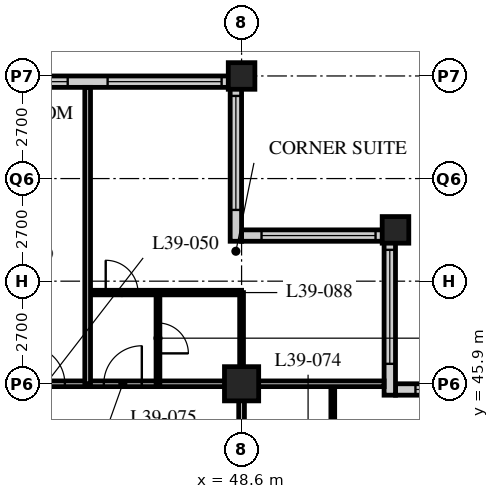
"""IFC4 building model, lengths in metres.
Left out: names, types, materials, properties, quantities, classifications, styles, units other than length and angle.
Written with IfcOpenShell. Run it as: python <this file> out.ifc"""

import sys

from ifc_helpers import new_model, si_unit, direction, frame, frame_2d, origin, origin_2d, place, context, subcontext, project, spatial, rectangle, hollow_rectangle, extrude, element, fill, save


model = new_model("IFC4")
c1 = context("Model", 3, precision=1e-05, world=origin(), true_north=direction((0.0, 1.0)))
c2 = subcontext(c1, "Body", "Model", "MODEL_VIEW")
j1 = project(units=[si_unit("LENGTHUNIT", "METRE"), si_unit("PLANEANGLEUNIT", "RADIAN")], contexts=[c1])
p1 = place(None, origin())
s1 = spatial("IfcSite", under=j1, at=p1, CompositionType="ELEMENT")
p2 = place(p1, origin())
s2 = spatial("IfcBuilding", under=s1, at=p2, CompositionType="ELEMENT")
p3 = place(p2, frame((0.0, 0.0, 151.0)))
s3 = spatial("IfcBuildingStorey", under=s2, at=p3, CompositionType="ELEMENT", Elevation=151.0)
p4 = place(p3, frame((48.6, 45.9, 0.0), z_axis=(0.0, 0.0, 1.0), x_axis=(1.0, 0.0, 0.0)))
e1 = element("IfcColumn", 1, at=p4, inside=s3, PredefinedType="COLUMN", context=c2, shape_type="SweptSolid", body=[
    extrude(hollow_rectangle(XDim=0.9, YDim=0.9, WallThickness=0.1, at=origin_2d()), origin(), (0.0, 0.0, 1.0), 3.4),
])
for number, where, z_axis, x_axis in (
    (2, (48.6, 54.0, 0.0), (0.0, 0.0, 1.0), (1.0, 0.0, 0.0)),
    (3, (52.65, 49.95, 0.0), (0.0, 0.0, 1.0), (1.0, 0.0, 0.0)),
):
    element("IfcColumn", number, at=place(p3, frame(where, z_axis=z_axis, x_axis=x_axis)), inside=s3, PredefinedType="COLUMN", context=c2, shape_type="SweptSolid", body=[
        extrude(hollow_rectangle(XDim=0.7, YDim=0.7, WallThickness=0.07, at=origin_2d()), origin(), (0.0, 0.0, 1.0), 3.4),
    ])
p5 = place(p3, frame((56.4, 45.75, 0.0), z_axis=(0.0, 0.0, 1.0), x_axis=(-1.0, 0.0, 0.0)))
e4 = element("IfcWall", 4, at=p5, inside=s3, PredefinedType="SOLIDWALL", context=c2, shape_type="SweptSolid", body=[
    extrude(rectangle(XDim=3.75, YDim=0.3, at=frame_2d((1.875, 0.0))), origin(), (0.0, 0.0, 1.0), 3.19),
])
p6 = place(p5, frame((0.225, 0.0, 0.9)))
e5 = element("IfcOpeningElement", 5, at=p6, cuts=e4, PredefinedType="OPENING", context=c2, shape_type="SweptSolid", body=[
    extrude(rectangle(XDim=3.0, YDim=1.4, at=frame_2d((1.5, 0.7))), frame((0.0, 0.16, 0.0), z_axis=(0.0, -1.0, 0.0), x_axis=(1.0, 0.0, 0.0)), (0.0, 0.0, 1.0), 0.32),
])
p7 = place(p3, frame((52.5, 45.6, 0.0), z_axis=(0.0, 0.0, 1.0), x_axis=(0.0, 1.0, 0.0)))
e6 = element("IfcWall", 6, at=p7, inside=s3, PredefinedType="SOLIDWALL", context=c2, shape_type="SweptSolid", body=[
    extrude(rectangle(XDim=4.35, YDim=0.3, at=frame_2d((2.175, 0.0))), origin(), (0.0, 0.0, 1.0), 3.19),
])
p8 = place(p7, frame((0.825, 0.0, 0.9)))
e7 = element("IfcOpeningElement", 7, at=p8, cuts=e6, PredefinedType="OPENING", context=c2, shape_type="SweptSolid", body=[
    extrude(rectangle(XDim=3.0, YDim=1.4, at=frame_2d((1.5, 0.7))), frame((0.0, 0.16, 0.0), z_axis=(0.0, -1.0, 0.0), x_axis=(1.0, 0.0, 0.0)), (0.0, 0.0, 1.0), 0.32),
])
p9 = place(p3, frame((52.35, 49.8, 0.0), z_axis=(0.0, 0.0, 1.0), x_axis=(-1.0, 0.0, 0.0)))
e8 = element("IfcWall", 8, at=p9, inside=s3, PredefinedType="SOLIDWALL", context=c2, shape_type="SweptSolid", body=[
    extrude(rectangle(XDim=3.75, YDim=0.3, at=frame_2d((1.875, 0.0))), origin(), (0.0, 0.0, 1.0), 3.19),
])
p10 = place(p9, frame((0.225, 0.0, 0.9)))
e9 = element("IfcOpeningElement", 9, at=p10, cuts=e8, PredefinedType="OPENING", context=c2, shape_type="SweptSolid", body=[
    extrude(rectangle(XDim=3.0, YDim=1.4, at=frame_2d((1.5, 0.7))), frame((0.0, 0.16, 0.0), z_axis=(0.0, -1.0, 0.0), x_axis=(1.0, 0.0, 0.0)), (0.0, 0.0, 1.0), 0.32),
])
p11 = place(p3, frame((48.45, 49.65, 0.0), z_axis=(0.0, 0.0, 1.0), x_axis=(0.0, 1.0, 0.0)))
e10 = element("IfcWall", 10, at=p11, inside=s3, PredefinedType="SOLIDWALL", context=c2, shape_type="SweptSolid", body=[
    extrude(rectangle(XDim=4.35, YDim=0.3, at=frame_2d((2.175, 0.0))), origin(), (0.0, 0.0, 1.0), 3.19),
])
p12 = place(p11, frame((0.825, 0.0, 0.9)))
e11 = element("IfcOpeningElement", 11, at=p12, cuts=e10, PredefinedType="OPENING", context=c2, shape_type="SweptSolid", body=[
    extrude(rectangle(XDim=3.0, YDim=1.4, at=frame_2d((1.5, 0.7))), frame((0.0, 0.16, 0.0), z_axis=(0.0, -1.0, 0.0), x_axis=(1.0, 0.0, 0.0)), (0.0, 0.0, 1.0), 0.32),
])
p13 = place(p3, frame((48.3, 53.85, 0.0), z_axis=(0.0, 0.0, 1.0), x_axis=(-1.0, 0.0, 0.0)))
e12 = element("IfcWall", 12, at=p13, inside=s3, PredefinedType="SOLIDWALL", context=c2, shape_type="SweptSolid", body=[
    extrude(rectangle(XDim=40.2, YDim=0.3, at=frame_2d((20.1, 0.0))), origin(), (0.0, 0.0, 1.0), 3.19),
])
p14 = place(p13, frame((0.225, 0.0, 0.9)))
e13 = element("IfcOpeningElement", 13, at=p14, cuts=e12, PredefinedType="OPENING", context=c2, shape_type="SweptSolid", body=[
    extrude(rectangle(XDim=3.0, YDim=1.4, at=frame_2d((1.5, 0.7))), frame((0.0, 0.16, 0.0), z_axis=(0.0, -1.0, 0.0), x_axis=(1.0, 0.0, 0.0)), (0.0, 0.0, 1.0), 0.32),
])
p15 = place(p13, frame((4.275, 0.0, 0.9)))
e14 = element("IfcOpeningElement", 14, at=p15, cuts=e12, PredefinedType="OPENING", context=c2, shape_type="SweptSolid", body=[
    extrude(rectangle(XDim=3.0, YDim=1.4, at=frame_2d((1.5, 0.7))), frame((0.0, 0.16, 0.0), z_axis=(0.0, -1.0, 0.0), x_axis=(1.0, 0.0, 0.0)), (0.0, 0.0, 1.0), 0.32),
])
p16 = place(p13, frame((8.325, 0.0, 0.9)))
e15 = element("IfcOpeningElement", 15, at=p16, cuts=e12, PredefinedType="OPENING", context=c2, shape_type="SweptSolid", body=[
    extrude(rectangle(XDim=3.0, YDim=1.4, at=frame_2d((1.5, 0.7))), frame((0.0, 0.16, 0.0), z_axis=(0.0, -1.0, 0.0), x_axis=(1.0, 0.0, 0.0)), (0.0, 0.0, 1.0), 0.32),
])
p17 = place(p13, frame((12.375, 0.0, 0.9)))
e16 = element("IfcOpeningElement", 16, at=p17, cuts=e12, PredefinedType="OPENING", context=c2, shape_type="SweptSolid", body=[
    extrude(rectangle(XDim=3.0, YDim=1.4, at=frame_2d((1.5, 0.7))), frame((0.0, 0.16, 0.0), z_axis=(0.0, -1.0, 0.0), x_axis=(1.0, 0.0, 0.0)), (0.0, 0.0, 1.0), 0.32),
])
p18 = place(p13, frame((16.425, 0.0, 0.9)))
e17 = element("IfcOpeningElement", 17, at=p18, cuts=e12, PredefinedType="OPENING", context=c2, shape_type="SweptSolid", body=[
    extrude(rectangle(XDim=3.0, YDim=1.4, at=frame_2d((1.5, 0.7))), frame((0.0, 0.16, 0.0), z_axis=(0.0, -1.0, 0.0), x_axis=(1.0, 0.0, 0.0)), (0.0, 0.0, 1.0), 0.32),
])
p19 = place(p13, frame((20.475, 0.0, 0.9)))
e18 = element("IfcOpeningElement", 18, at=p19, cuts=e12, PredefinedType="OPENING", context=c2, shape_type="SweptSolid", body=[
    extrude(rectangle(XDim=3.0, YDim=1.4, at=frame_2d((1.5, 0.7))), frame((0.0, 0.16, 0.0), z_axis=(0.0, -1.0, 0.0), x_axis=(1.0, 0.0, 0.0)), (0.0, 0.0, 1.0), 0.32),
])
p20 = place(p13, frame((24.525, 0.0, 0.9)))
e19 = element("IfcOpeningElement", 19, at=p20, cuts=e12, PredefinedType="OPENING", context=c2, shape_type="SweptSolid", body=[
    extrude(rectangle(XDim=3.0, YDim=1.4, at=frame_2d((1.5, 0.7))), frame((0.0, 0.16, 0.0), z_axis=(0.0, -1.0, 0.0), x_axis=(1.0, 0.0, 0.0)), (0.0, 0.0, 1.0), 0.32),
])
p21 = place(p13, frame((28.575, 0.0, 0.9)))
e20 = element("IfcOpeningElement", 20, at=p21, cuts=e12, PredefinedType="OPENING", context=c2, shape_type="SweptSolid", body=[
    extrude(rectangle(XDim=3.0, YDim=1.4, at=frame_2d((1.5, 0.7))), frame((0.0, 0.16, 0.0), z_axis=(0.0, -1.0, 0.0), x_axis=(1.0, 0.0, 0.0)), (0.0, 0.0, 1.0), 0.32),
])
p22 = place(p13, frame((32.625, 0.0, 0.9)))
e21 = element("IfcOpeningElement", 21, at=p22, cuts=e12, PredefinedType="OPENING", context=c2, shape_type="SweptSolid", body=[
    extrude(rectangle(XDim=3.0, YDim=1.4, at=frame_2d((1.5, 0.7))), frame((0.0, 0.16, 0.0), z_axis=(0.0, -1.0, 0.0), x_axis=(1.0, 0.0, 0.0)), (0.0, 0.0, 1.0), 0.32),
])
p23 = place(p13, frame((36.675, 0.0, 0.9)))
e22 = element("IfcOpeningElement", 22, at=p23, cuts=e12, PredefinedType="OPENING", context=c2, shape_type="SweptSolid", body=[
    extrude(rectangle(XDim=3.0, YDim=1.4, at=frame_2d((1.5, 0.7))), frame((0.0, 0.16, 0.0), z_axis=(0.0, -1.0, 0.0), x_axis=(1.0, 0.0, 0.0)), (0.0, 0.0, 1.0), 0.32),
])
p24 = place(p3, frame((8.1, 45.9, 0.0), z_axis=(0.0, 0.0, 1.0), x_axis=(1.0, 0.0, 0.0)))
e23 = element("IfcWall", 23, at=p24, inside=s3, PredefinedType="PARTITIONING", context=c2, shape_type="SweptSolid", body=[
    extrude(rectangle(XDim=40.5, YDim=0.15, at=frame_2d((20.25, 0.0))), origin(), (0.0, 0.0, 1.0), 2.42),
])
p25 = place(p24, frame((9.625, 0.0, 0.0)))
e24 = element("IfcOpeningElement", 24, at=p25, cuts=e23, PredefinedType="OPENING", context=c2, shape_type="SweptSolid", body=[
    extrude(rectangle(XDim=1.0, YDim=2.1, at=frame_2d((0.5, 1.05))), frame((0.0, 0.085, 0.0), z_axis=(0.0, -1.0, 0.0), x_axis=(1.0, 0.0, 0.0)), (0.0, 0.0, 1.0), 0.17),
])
p26 = place(p24, frame((21.775, 0.0, 0.0)))
e25 = element("IfcOpeningElement", 25, at=p26, cuts=e23, PredefinedType="OPENING", context=c2, shape_type="SweptSolid", body=[
    extrude(rectangle(XDim=1.0, YDim=2.1, at=frame_2d((0.5, 1.05))), frame((0.0, 0.085, 0.0), z_axis=(0.0, -1.0, 0.0), x_axis=(1.0, 0.0, 0.0)), (0.0, 0.0, 1.0), 0.17),
])
p27 = place(p24, frame((28.95, 0.0, 0.0)))
e26 = element("IfcOpeningElement", 26, at=p27, cuts=e23, PredefinedType="OPENING", context=c2, shape_type="SweptSolid", body=[
    extrude(rectangle(XDim=1.0, YDim=2.1, at=frame_2d((0.5, 1.05))), frame((0.0, 0.085, 0.0), z_axis=(0.0, -1.0, 0.0), x_axis=(1.0, 0.0, 0.0)), (0.0, 0.0, 1.0), 0.17),
])
p28 = place(p24, frame((34.85, 0.0, 0.0)))
e27 = element("IfcOpeningElement", 27, at=p28, cuts=e23, PredefinedType="OPENING", context=c2, shape_type="SweptSolid", body=[
    extrude(rectangle(XDim=1.0, YDim=2.1, at=frame_2d((0.5, 1.05))), frame((0.0, 0.085, 0.0), z_axis=(0.0, -1.0, 0.0), x_axis=(1.0, 0.0, 0.0)), (0.0, 0.0, 1.0), 0.17),
])
p29 = place(p24, frame((36.875, 0.0, 0.0)))
e28 = element("IfcOpeningElement", 28, at=p29, cuts=e23, PredefinedType="OPENING", context=c2, shape_type="SweptSolid", body=[
    extrude(rectangle(XDim=1.0, YDim=2.1, at=frame_2d((0.5, 1.05))), frame((0.0, 0.085, 0.0), z_axis=(0.0, -1.0, 0.0), x_axis=(1.0, 0.0, 0.0)), (0.0, 0.0, 1.0), 0.17),
])
p30 = place(p24, frame((2.625, 0.0, 0.0)))
e29 = element("IfcOpeningElement", 29, at=p30, cuts=e23, PredefinedType="OPENING", context=c2, shape_type="SweptSolid", body=[
    extrude(rectangle(XDim=1.0, YDim=2.1, at=frame_2d((0.5, 1.05))), frame((0.0, 0.085, 0.0), z_axis=(0.0, -1.0, 0.0), x_axis=(1.0, 0.0, 0.0)), (0.0, 0.0, 1.0), 0.17),
])
p31 = place(p3, frame((48.6, 17.55, 0.0), z_axis=(0.0, 0.0, 1.0), x_axis=(0.0, 1.0, 0.0)))
e30 = element("IfcWall", 30, at=p31, inside=s3, PredefinedType="PARTITIONING", context=c2, shape_type="SweptSolid", body=[
    extrude(rectangle(XDim=28.35, YDim=0.15, at=frame_2d((14.175, 0.0))), origin(), (0.0, 0.0, 1.0), 2.42),
])
p32 = place(p31, frame((0.3, 0.0, 0.0)))
e31 = element("IfcOpeningElement", 31, at=p32, cuts=e30, PredefinedType="OPENING", context=c2, shape_type="SweptSolid", body=[
    extrude(rectangle(XDim=1.0, YDim=2.1, at=frame_2d((0.5, 1.05))), frame((0.0, 0.085, 0.0), z_axis=(0.0, -1.0, 0.0), x_axis=(1.0, 0.0, 0.0)), (0.0, 0.0, 1.0), 0.17),
])
p33 = place(p31, frame((6.5, 0.0, 0.0)))
e32 = element("IfcOpeningElement", 32, at=p33, cuts=e30, PredefinedType="OPENING", context=c2, shape_type="SweptSolid", body=[
    extrude(rectangle(XDim=1.0, YDim=2.1, at=frame_2d((0.5, 1.05))), frame((0.0, 0.085, 0.0), z_axis=(0.0, -1.0, 0.0), x_axis=(1.0, 0.0, 0.0)), (0.0, 0.0, 1.0), 0.17),
])
p34 = place(p31, frame((13.675, 0.0, 0.0)))
e33 = element("IfcOpeningElement", 33, at=p34, cuts=e30, PredefinedType="OPENING", context=c2, shape_type="SweptSolid", body=[
    extrude(rectangle(XDim=1.0, YDim=2.1, at=frame_2d((0.5, 1.05))), frame((0.0, 0.085, 0.0), z_axis=(0.0, -1.0, 0.0), x_axis=(1.0, 0.0, 0.0)), (0.0, 0.0, 1.0), 0.17),
])
p35 = place(p31, frame((22.7, 0.0, 0.0)))
e34 = element("IfcOpeningElement", 34, at=p35, cuts=e30, PredefinedType="OPENING", context=c2, shape_type="SweptSolid", body=[
    extrude(rectangle(XDim=1.0, YDim=2.1, at=frame_2d((0.5, 1.05))), frame((0.0, 0.085, 0.0), z_axis=(0.0, -1.0, 0.0), x_axis=(1.0, 0.0, 0.0)), (0.0, 0.0, 1.0), 0.17),
])
p36 = place(p31, frame((24.9, 0.0, 0.0)))
e35 = element("IfcOpeningElement", 35, at=p36, cuts=e30, PredefinedType="OPENING", context=c2, shape_type="SweptSolid", body=[
    extrude(rectangle(XDim=1.0, YDim=2.1, at=frame_2d((0.5, 1.05))), frame((0.0, 0.085, 0.0), z_axis=(0.0, -1.0, 0.0), x_axis=(1.0, 0.0, 0.0)), (0.0, 0.0, 1.0), 0.17),
])
p37 = place(p3, frame((51.0, 43.6, 0.0), z_axis=(0.0, 0.0, 1.0), x_axis=(0.0, 1.0, 0.0)))
e36 = element("IfcWall", 36, at=p37, inside=s3, PredefinedType="PARTITIONING", context=c2, shape_type="SweptSolid", body=[
    extrude(rectangle(XDim=2.3, YDim=0.1, at=frame_2d((1.15, 0.0))), origin(), (0.0, 0.0, 1.0), 3.19),
])
p38 = place(p3, frame((44.55, 48.3, 0.0), z_axis=(0.0, 0.0, 1.0), x_axis=(1.0, 0.0, 0.0)))
e37 = element("IfcWall", 37, at=p38, inside=s3, PredefinedType="PARTITIONING", context=c2, shape_type="SweptSolid", body=[
    extrude(rectangle(XDim=4.05, YDim=0.12, at=frame_2d((2.025, 0.0))), origin(), (0.0, 0.0, 1.0), 3.19),
])
p39 = place(p38, frame((0.475, 0.0, 0.0)))
e38 = element("IfcOpeningElement", 38, at=p39, cuts=e37, PredefinedType="OPENING", context=c2, shape_type="SweptSolid", body=[
    extrude(rectangle(XDim=0.85, YDim=2.1, at=frame_2d((0.425, 1.05))), frame((0.0, 0.07, 0.0), z_axis=(0.0, -1.0, 0.0), x_axis=(1.0, 0.0, 0.0)), (0.0, 0.0, 1.0), 0.14),
])
p40 = place(p3, frame((46.4, 45.9, 0.0), z_axis=(0.0, 0.0, 1.0), x_axis=(0.0, 1.0, 0.0)))
e39 = element("IfcWall", 39, at=p40, inside=s3, PredefinedType="PARTITIONING", context=c2, shape_type="SweptSolid", body=[
    extrude(rectangle(XDim=2.4, YDim=0.1, at=frame_2d((1.2, 0.0))), origin(), (0.0, 0.0, 1.0), 3.19),
])
p41 = place(p40, frame((0.8, 0.0, 0.0)))
e40 = element("IfcOpeningElement", 40, at=p41, cuts=e39, PredefinedType="OPENING", context=c2, shape_type="SweptSolid", body=[
    extrude(rectangle(XDim=0.8, YDim=2.1, at=frame_2d((0.4, 1.05))), frame((0.0, 0.06, 0.0), z_axis=(0.0, -1.0, 0.0), x_axis=(1.0, 0.0, 0.0)), (0.0, 0.0, 1.0), 0.12),
])
p42 = place(p3, frame((48.6, 45.9, 0.0), z_axis=(0.0, 0.0, 1.0), x_axis=(0.0, 1.0, 0.0)))
e41 = element("IfcWall", 41, at=p42, inside=s3, PredefinedType="PARTITIONING", context=c2, shape_type="SweptSolid", body=[
    extrude(rectangle(XDim=2.4, YDim=0.1, at=frame_2d((1.2, 0.0))), origin(), (0.0, 0.0, 1.0), 2.42),
])
p43 = place(p3, frame((48.6, 45.9, 0.0), z_axis=(0.0, 0.0, 1.0), x_axis=(1.0, 0.0, 0.0)))
e42 = element("IfcWall", 42, at=p43, inside=s3, PredefinedType="PARTITIONING", context=c2, shape_type="SweptSolid", body=[
    extrude(rectangle(XDim=3.75, YDim=0.15, at=frame_2d((1.875, 0.0))), origin(), (0.0, 0.0, 1.0), 2.42),
])
p44 = place(p3, frame((44.55, 45.9, 0.0), z_axis=(0.0, 0.0, 1.0), x_axis=(0.0, 1.0, 0.0)))
e43 = element("IfcWall", 43, at=p44, inside=s3, PredefinedType="PARTITIONING", context=c2, shape_type="SweptSolid", body=[
    extrude(rectangle(XDim=7.8, YDim=0.15, at=frame_2d((3.9, 0.0))), origin(), (0.0, 0.0, 1.0), 3.19),
])
p45 = place(p6, origin())
e44 = element("IfcWindow", 44, at=p45, inside=s3, PartitioningType="SINGLE_PANEL", PredefinedType="WINDOW", context=c2, shape_type="SweptSolid", body=[
    extrude(rectangle(XDim=3.0, YDim=1.4, at=frame_2d((1.5, 0.7))), frame((0.0, 0.03, 0.0), z_axis=(0.0, -1.0, 0.0), x_axis=(1.0, 0.0, 0.0)), (0.0, 0.0, 1.0), 0.06),
])
fill(e5, e44)
p46 = place(p8, origin())
e45 = element("IfcWindow", 45, at=p46, inside=s3, PartitioningType="SINGLE_PANEL", PredefinedType="WINDOW", context=c2, shape_type="SweptSolid", body=[
    extrude(rectangle(XDim=3.0, YDim=1.4, at=frame_2d((1.5, 0.7))), frame((0.0, 0.03, 0.0), z_axis=(0.0, -1.0, 0.0), x_axis=(1.0, 0.0, 0.0)), (0.0, 0.0, 1.0), 0.06),
])
fill(e7, e45)
p47 = place(p10, origin())
e46 = element("IfcWindow", 46, at=p47, inside=s3, PartitioningType="SINGLE_PANEL", PredefinedType="WINDOW", context=c2, shape_type="SweptSolid", body=[
    extrude(rectangle(XDim=3.0, YDim=1.4, at=frame_2d((1.5, 0.7))), frame((0.0, 0.03, 0.0), z_axis=(0.0, -1.0, 0.0), x_axis=(1.0, 0.0, 0.0)), (0.0, 0.0, 1.0), 0.06),
])
fill(e9, e46)
p48 = place(p12, origin())
e47 = element("IfcWindow", 47, at=p48, inside=s3, PartitioningType="SINGLE_PANEL", PredefinedType="WINDOW", context=c2, shape_type="SweptSolid", body=[
    extrude(rectangle(XDim=3.0, YDim=1.4, at=frame_2d((1.5, 0.7))), frame((0.0, 0.03, 0.0), z_axis=(0.0, -1.0, 0.0), x_axis=(1.0, 0.0, 0.0)), (0.0, 0.0, 1.0), 0.06),
])
fill(e11, e47)
p49 = place(p14, origin())
e48 = element("IfcWindow", 48, at=p49, inside=s3, PartitioningType="SINGLE_PANEL", PredefinedType="WINDOW", context=c2, shape_type="SweptSolid", body=[
    extrude(rectangle(XDim=3.0, YDim=1.4, at=frame_2d((1.5, 0.7))), frame((0.0, 0.03, 0.0), z_axis=(0.0, -1.0, 0.0), x_axis=(1.0, 0.0, 0.0)), (0.0, 0.0, 1.0), 0.06),
])
fill(e13, e48)
p50 = place(p15, origin())
e49 = element("IfcWindow", 49, at=p50, inside=s3, PartitioningType="SINGLE_PANEL", PredefinedType="WINDOW", context=c2, shape_type="SweptSolid", body=[
    extrude(rectangle(XDim=3.0, YDim=1.4, at=frame_2d((1.5, 0.7))), frame((0.0, 0.03, 0.0), z_axis=(0.0, -1.0, 0.0), x_axis=(1.0, 0.0, 0.0)), (0.0, 0.0, 1.0), 0.06),
])
fill(e14, e49)
p51 = place(p28, origin())
e50 = element("IfcDoor", 50, at=p51, inside=s3, OperationType="SINGLE_SWING_LEFT", PredefinedType="DOOR", context=c2, shape_type="SweptSolid", body=[
    extrude(rectangle(XDim=1.0, YDim=2.1, at=frame_2d((0.5, 1.05))), frame((0.0, 0.025, 0.0), z_axis=(0.0, -1.0, 0.0), x_axis=(1.0, 0.0, 0.0)), (0.0, 0.0, 1.0), 0.05),
])
fill(e27, e50)
p52 = place(p41, origin())
e51 = element("IfcDoor", 51, at=p52, inside=s3, OperationType="SINGLE_SWING_RIGHT", PredefinedType="DOOR", context=c2, shape_type="SweptSolid", body=[
    extrude(rectangle(XDim=0.8, YDim=2.1, at=frame_2d((0.4, 1.05))), frame((0.0, 0.025, 0.0), z_axis=(0.0, -1.0, 0.0), x_axis=(1.0, 0.0, 0.0)), (0.0, 0.0, 1.0), 0.05),
])
fill(e40, e51)
p53 = place(p29, origin())
e52 = element("IfcDoor", 52, at=p53, inside=s3, OperationType="SINGLE_SWING_RIGHT", PredefinedType="DOOR", context=c2, shape_type="SweptSolid", body=[
    extrude(rectangle(XDim=1.0, YDim=2.1, at=frame_2d((0.5, 1.05))), frame((0.0, 0.025, 0.0), z_axis=(0.0, -1.0, 0.0), x_axis=(1.0, 0.0, 0.0)), (0.0, 0.0, 1.0), 0.05),
])
fill(e28, e52)
p54 = place(p39, origin())
e53 = element("IfcDoor", 53, at=p54, inside=s3, OperationType="SINGLE_SWING_LEFT", PredefinedType="DOOR", context=c2, shape_type="SweptSolid", body=[
    extrude(rectangle(XDim=0.85, YDim=2.1, at=frame_2d((0.425, 1.05))), frame((0.0, 0.025, 0.0), z_axis=(0.0, -1.0, 0.0), x_axis=(1.0, 0.0, 0.0)), (0.0, 0.0, 1.0), 0.05),
])
fill(e38, e53)
save(model, sys.argv[1])
